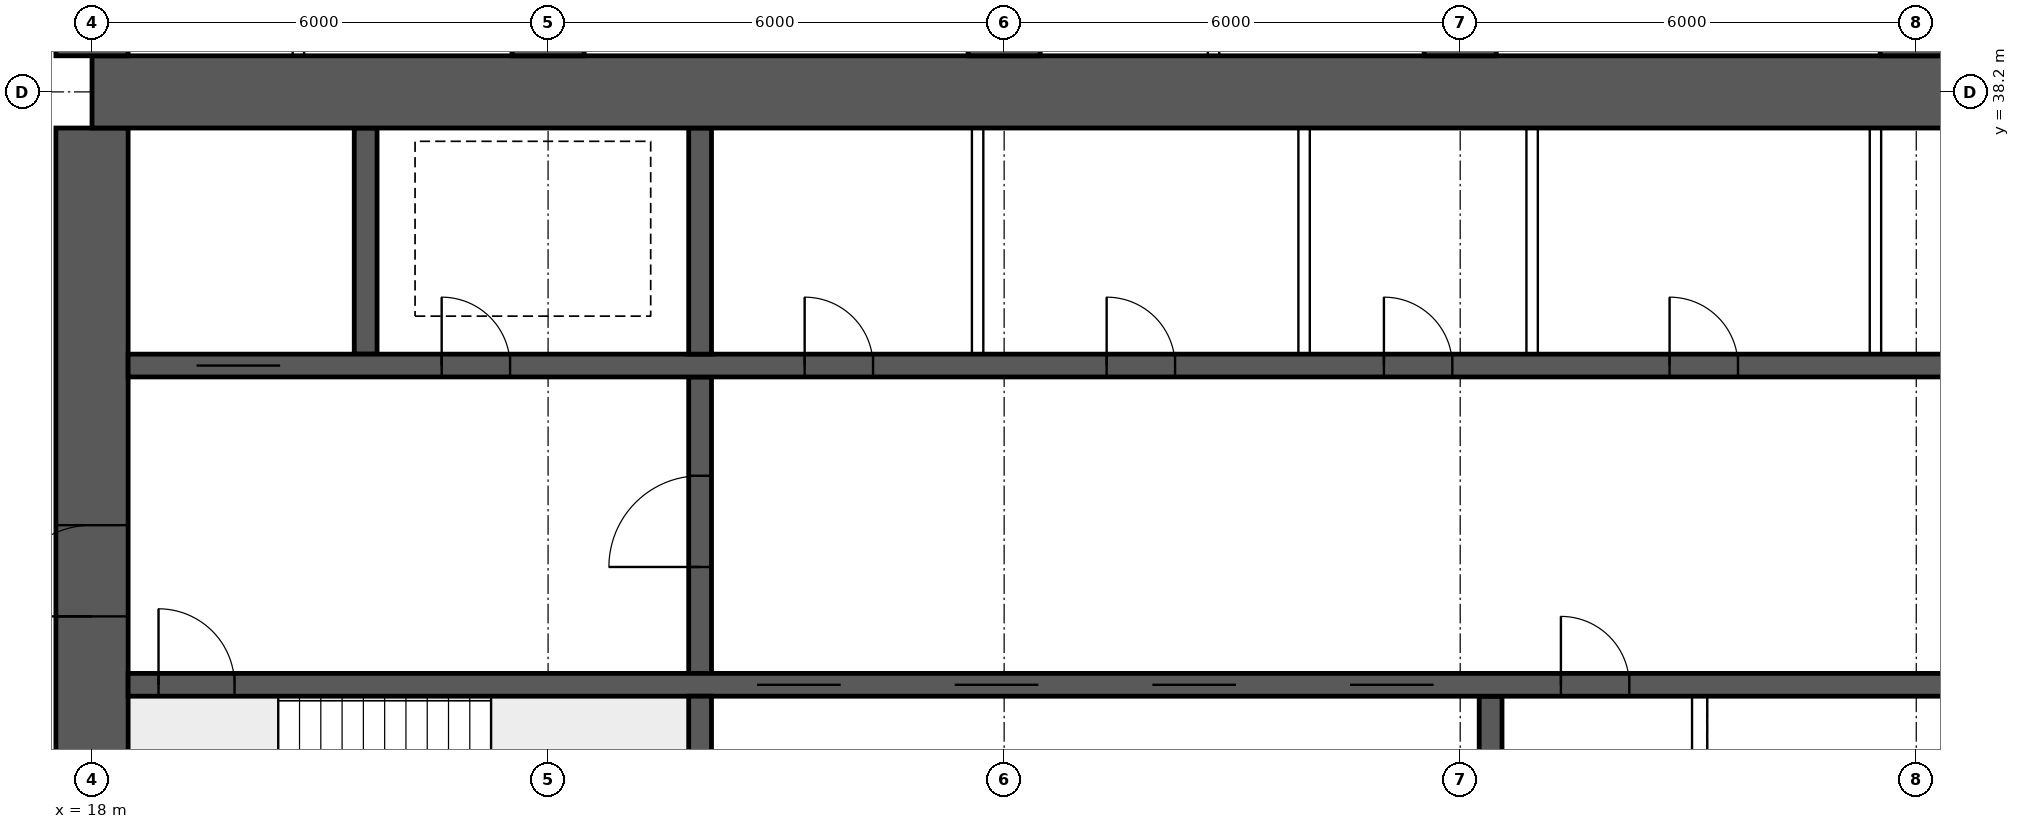
"""IFC4 building model, lengths in metres.
Left out: names, types, materials, properties, quantities, classifications, styles, units other than length and angle.
Written with IfcOpenShell. Run it as: python <this file> out.ifc"""

import sys

from ifc_helpers import new_model, si_unit, direction, frame, frame_2d, origin, place, context, subcontext, project, spatial, rectangle, extrude, element, fill, save


model = new_model("IFC4")
c1 = context("Model", 3, precision=1e-05, world=origin(), true_north=direction((0.0, 1.0)))
c2 = subcontext(c1, "Body", "Model", "MODEL_VIEW")
j1 = project(units=[si_unit("LENGTHUNIT", "METRE"), si_unit("PLANEANGLEUNIT", "RADIAN")], contexts=[c1])
p1 = place(None, origin())
s1 = spatial("IfcSite", under=j1, at=p1, CompositionType="ELEMENT")
p2 = place(p1, origin())
s2 = spatial("IfcBuilding", under=s1, at=p2, CompositionType="ELEMENT")
p3 = place(p2, frame((0.0, 0.0, 99.4)))
s3 = spatial("IfcBuildingStorey", under=s2, at=p3, CompositionType="ELEMENT", Elevation=99.4)
p4 = place(p3, frame((18.0, 38.2, 0.0), z_axis=(0.0, 0.0, 1.0), x_axis=(1.0, 0.0, 0.0)))
e1 = element("IfcWall", 1, at=p4, inside=s3, PredefinedType="SHEAR", context=c2, shape_type="SweptSolid", body=[
    extrude(rectangle(XDim=48.0, YDim=0.95, at=frame_2d((24.0, 0.0))), origin(), (0.0, 0.0, 1.0), 3.75),
])
p5 = place(p3, frame((18.0, 26.275, 0.0), z_axis=(0.0, 0.0, 1.0), x_axis=(0.0, 1.0, 0.0)))
e2 = element("IfcWall", 2, at=p5, inside=s3, PredefinedType="SHEAR", context=c2, shape_type="SweptSolid", body=[
    extrude(rectangle(XDim=11.45, YDim=0.95, at=frame_2d((5.725, 0.0))), origin(), (0.0, 0.0, 1.0), 3.75),
])
p6 = place(p5, frame((5.025, 0.0, 0.0)))
e3 = element("IfcOpeningElement", 3, at=p6, cuts=e2, PredefinedType="OPENING", context=c2, shape_type="SweptSolid", body=[
    extrude(rectangle(XDim=1.2, YDim=2.1, at=frame_2d((0.6, 1.05))), frame((0.0, 0.485, 0.0), z_axis=(0.0, -1.0, 0.0), x_axis=(1.0, 0.0, 0.0)), (0.0, 0.0, 1.0), 0.97),
])
p7 = place(p3, frame((18.475, 30.4, 0.0), z_axis=(0.0, 0.0, 1.0), x_axis=(1.0, 0.0, 0.0)))
e4 = element("IfcWall", 4, at=p7, inside=s3, PredefinedType="SHEAR", context=c2, shape_type="SweptSolid", body=[
    extrude(rectangle(XDim=47.05, YDim=0.3, at=frame_2d((23.525, 0.0))), origin(), (0.0, 0.0, 1.0), 3.75),
])
p8 = place(p7, frame((0.4, 0.0, 0.0)))
e5 = element("IfcOpeningElement", 5, at=p8, cuts=e4, PredefinedType="OPENING", context=c2, shape_type="SweptSolid", body=[
    extrude(rectangle(XDim=1.0, YDim=2.1, at=frame_2d((0.5, 1.05))), frame((0.0, 0.16, 0.0), z_axis=(0.0, -1.0, 0.0), x_axis=(1.0, 0.0, 0.0)), (0.0, 0.0, 1.0), 0.32),
])
p9 = place(p7, frame((45.65, 0.0, 0.0)))
e6 = element("IfcOpeningElement", 6, at=p9, cuts=e4, PredefinedType="OPENING", context=c2, shape_type="SweptSolid", body=[
    extrude(rectangle(XDim=1.0, YDim=2.1, at=frame_2d((0.5, 1.05))), frame((0.0, 0.16, 0.0), z_axis=(0.0, -1.0, 0.0), x_axis=(1.0, 0.0, 0.0)), (0.0, 0.0, 1.0), 0.32),
])
p10 = place(p7, frame((8.275, 0.0, 0.0)))
e7 = element("IfcOpeningElement", 7, at=p10, cuts=e4, PredefinedType="OPENING", context=c2, shape_type="SweptSolid", body=[
    extrude(rectangle(XDim=1.1, YDim=2.1, at=frame_2d((0.55, 1.05))), frame((0.0, 0.16, 0.0), z_axis=(0.0, -1.0, 0.0), x_axis=(1.0, 0.0, 0.0)), (0.0, 0.0, 1.0), 0.32),
])
p11 = place(p7, frame((10.875, 0.0, 0.0)))
e8 = element("IfcOpeningElement", 8, at=p11, cuts=e4, PredefinedType="OPENING", context=c2, shape_type="SweptSolid", body=[
    extrude(rectangle(XDim=1.1, YDim=2.1, at=frame_2d((0.55, 1.05))), frame((0.0, 0.16, 0.0), z_axis=(0.0, -1.0, 0.0), x_axis=(1.0, 0.0, 0.0)), (0.0, 0.0, 1.0), 0.32),
])
p12 = place(p7, frame((13.475, 0.0, 0.0)))
e9 = element("IfcOpeningElement", 9, at=p12, cuts=e4, PredefinedType="OPENING", context=c2, shape_type="SweptSolid", body=[
    extrude(rectangle(XDim=1.1, YDim=2.1, at=frame_2d((0.55, 1.05))), frame((0.0, 0.16, 0.0), z_axis=(0.0, -1.0, 0.0), x_axis=(1.0, 0.0, 0.0)), (0.0, 0.0, 1.0), 0.32),
])
p13 = place(p7, frame((16.075, 0.0, 0.0)))
e10 = element("IfcOpeningElement", 10, at=p13, cuts=e4, PredefinedType="OPENING", context=c2, shape_type="SweptSolid", body=[
    extrude(rectangle(XDim=1.1, YDim=2.1, at=frame_2d((0.55, 1.05))), frame((0.0, 0.16, 0.0), z_axis=(0.0, -1.0, 0.0), x_axis=(1.0, 0.0, 0.0)), (0.0, 0.0, 1.0), 0.32),
])
p14 = place(p7, frame((18.85, 0.0, 0.0)))
e11 = element("IfcOpeningElement", 11, at=p14, cuts=e4, PredefinedType="OPENING", context=c2, shape_type="SweptSolid", body=[
    extrude(rectangle(XDim=0.9, YDim=2.1, at=frame_2d((0.45, 1.05))), frame((0.0, 0.16, 0.0), z_axis=(0.0, -1.0, 0.0), x_axis=(1.0, 0.0, 0.0)), (0.0, 0.0, 1.0), 0.32),
])
p15 = place(p7, frame((30.142, 0.0, 0.0)))
e12 = element("IfcOpeningElement", 12, at=p15, cuts=e4, PredefinedType="OPENING", context=c2, shape_type="SweptSolid", body=[
    extrude(rectangle(XDim=1.1, YDim=2.1, at=frame_2d((0.55, 1.05))), frame((0.0, 0.16, 0.0), z_axis=(0.0, -1.0, 0.0), x_axis=(1.0, 0.0, 0.0)), (0.0, 0.0, 1.0), 0.32),
])
p16 = place(p7, frame((33.675, 0.0, 0.0)))
e13 = element("IfcOpeningElement", 13, at=p16, cuts=e4, PredefinedType="OPENING", context=c2, shape_type="SweptSolid", body=[
    extrude(rectangle(XDim=1.1, YDim=2.1, at=frame_2d((0.55, 1.05))), frame((0.0, 0.16, 0.0), z_axis=(0.0, -1.0, 0.0), x_axis=(1.0, 0.0, 0.0)), (0.0, 0.0, 1.0), 0.32),
])
p17 = place(p7, frame((37.208, 0.0, 0.0)))
e14 = element("IfcOpeningElement", 14, at=p17, cuts=e4, PredefinedType="OPENING", context=c2, shape_type="SweptSolid", body=[
    extrude(rectangle(XDim=1.1, YDim=2.1, at=frame_2d((0.55, 1.05))), frame((0.0, 0.16, 0.0), z_axis=(0.0, -1.0, 0.0), x_axis=(1.0, 0.0, 0.0)), (0.0, 0.0, 1.0), 0.32),
])
p18 = place(p3, frame((18.475, 34.6, 0.0), z_axis=(0.0, 0.0, 1.0), x_axis=(1.0, 0.0, 0.0)))
e15 = element("IfcWall", 15, at=p18, inside=s3, PredefinedType="SHEAR", context=c2, shape_type="SweptSolid", body=[
    extrude(rectangle(XDim=47.05, YDim=0.3, at=frame_2d((23.525, 0.0))), origin(), (0.0, 0.0, 1.0), 3.75),
])
p19 = place(p18, frame((0.9, 0.0, 0.0)))
e16 = element("IfcOpeningElement", 16, at=p19, cuts=e15, PredefinedType="OPENING", context=c2, shape_type="SweptSolid", body=[
    extrude(rectangle(XDim=1.1, YDim=2.1, at=frame_2d((0.55, 1.05))), frame((0.0, 0.16, 0.0), z_axis=(0.0, -1.0, 0.0), x_axis=(1.0, 0.0, 0.0)), (0.0, 0.0, 1.0), 0.32),
])
p20 = place(p18, frame((45.05, 0.0, 0.0)))
e17 = element("IfcOpeningElement", 17, at=p20, cuts=e15, PredefinedType="OPENING", context=c2, shape_type="SweptSolid", body=[
    extrude(rectangle(XDim=1.1, YDim=2.1, at=frame_2d((0.55, 1.05))), frame((0.0, 0.16, 0.0), z_axis=(0.0, -1.0, 0.0), x_axis=(1.0, 0.0, 0.0)), (0.0, 0.0, 1.0), 0.32),
])
p21 = place(p18, frame((4.125, 0.0, 0.0)))
e18 = element("IfcOpeningElement", 18, at=p21, cuts=e15, PredefinedType="OPENING", context=c2, shape_type="SweptSolid", body=[
    extrude(rectangle(XDim=0.9, YDim=2.1, at=frame_2d((0.45, 1.05))), frame((0.0, 0.16, 0.0), z_axis=(0.0, -1.0, 0.0), x_axis=(1.0, 0.0, 0.0)), (0.0, 0.0, 1.0), 0.32),
])
p22 = place(p18, frame((42.025, 0.0, 0.0)))
e19 = element("IfcOpeningElement", 19, at=p22, cuts=e15, PredefinedType="OPENING", context=c2, shape_type="SweptSolid", body=[
    extrude(rectangle(XDim=0.9, YDim=2.1, at=frame_2d((0.45, 1.05))), frame((0.0, 0.16, 0.0), z_axis=(0.0, -1.0, 0.0), x_axis=(1.0, 0.0, 0.0)), (0.0, 0.0, 1.0), 0.32),
])
p23 = place(p18, frame((8.9, 0.0, 0.0)))
e20 = element("IfcOpeningElement", 20, at=p23, cuts=e15, PredefinedType="OPENING", context=c2, shape_type="SweptSolid", body=[
    extrude(rectangle(XDim=0.9, YDim=2.1, at=frame_2d((0.45, 1.05))), frame((0.0, 0.16, 0.0), z_axis=(0.0, -1.0, 0.0), x_axis=(1.0, 0.0, 0.0)), (0.0, 0.0, 1.0), 0.32),
])
p24 = place(p18, frame((12.874, 0.0, 0.0)))
e21 = element("IfcOpeningElement", 21, at=p24, cuts=e15, PredefinedType="OPENING", context=c2, shape_type="SweptSolid", body=[
    extrude(rectangle(XDim=0.9, YDim=2.1, at=frame_2d((0.45, 1.05))), frame((0.0, 0.16, 0.0), z_axis=(0.0, -1.0, 0.0), x_axis=(1.0, 0.0, 0.0)), (0.0, 0.0, 1.0), 0.32),
])
p25 = place(p18, frame((16.521, 0.0, 0.0)))
e22 = element("IfcOpeningElement", 22, at=p25, cuts=e15, PredefinedType="OPENING", context=c2, shape_type="SweptSolid", body=[
    extrude(rectangle(XDim=0.9, YDim=2.1, at=frame_2d((0.45, 1.05))), frame((0.0, 0.16, 0.0), z_axis=(0.0, -1.0, 0.0), x_axis=(1.0, 0.0, 0.0)), (0.0, 0.0, 1.0), 0.32),
])
p26 = place(p18, frame((20.28, 0.0, 0.0)))
e23 = element("IfcOpeningElement", 23, at=p26, cuts=e15, PredefinedType="OPENING", context=c2, shape_type="SweptSolid", body=[
    extrude(rectangle(XDim=0.9, YDim=2.1, at=frame_2d((0.45, 1.05))), frame((0.0, 0.16, 0.0), z_axis=(0.0, -1.0, 0.0), x_axis=(1.0, 0.0, 0.0)), (0.0, 0.0, 1.0), 0.32),
])
p27 = place(p18, frame((24.686, 0.0, 0.0)))
e24 = element("IfcOpeningElement", 24, at=p27, cuts=e15, PredefinedType="OPENING", context=c2, shape_type="SweptSolid", body=[
    extrude(rectangle(XDim=0.9, YDim=2.1, at=frame_2d((0.45, 1.05))), frame((0.0, 0.16, 0.0), z_axis=(0.0, -1.0, 0.0), x_axis=(1.0, 0.0, 0.0)), (0.0, 0.0, 1.0), 0.32),
])
p28 = place(p18, frame((27.483, 0.0, 0.0)))
e25 = element("IfcOpeningElement", 25, at=p28, cuts=e15, PredefinedType="OPENING", context=c2, shape_type="SweptSolid", body=[
    extrude(rectangle(XDim=0.9, YDim=2.1, at=frame_2d((0.45, 1.05))), frame((0.0, 0.16, 0.0), z_axis=(0.0, -1.0, 0.0), x_axis=(1.0, 0.0, 0.0)), (0.0, 0.0, 1.0), 0.32),
])
p29 = place(p18, frame((29.653, 0.0, 0.0)))
e26 = element("IfcOpeningElement", 26, at=p29, cuts=e15, PredefinedType="OPENING", context=c2, shape_type="SweptSolid", body=[
    extrude(rectangle(XDim=0.9, YDim=2.1, at=frame_2d((0.45, 1.05))), frame((0.0, 0.16, 0.0), z_axis=(0.0, -1.0, 0.0), x_axis=(1.0, 0.0, 0.0)), (0.0, 0.0, 1.0), 0.32),
])
p30 = place(p18, frame((33.452, 0.0, 0.0)))
e27 = element("IfcOpeningElement", 27, at=p30, cuts=e15, PredefinedType="OPENING", context=c2, shape_type="SweptSolid", body=[
    extrude(rectangle(XDim=0.9, YDim=2.1, at=frame_2d((0.45, 1.05))), frame((0.0, 0.16, 0.0), z_axis=(0.0, -1.0, 0.0), x_axis=(1.0, 0.0, 0.0)), (0.0, 0.0, 1.0), 0.32),
])
p31 = place(p18, frame((37.403, 0.0, 0.0)))
e28 = element("IfcOpeningElement", 28, at=p31, cuts=e15, PredefinedType="OPENING", context=c2, shape_type="SweptSolid", body=[
    extrude(rectangle(XDim=0.9, YDim=2.1, at=frame_2d((0.45, 1.05))), frame((0.0, 0.16, 0.0), z_axis=(0.0, -1.0, 0.0), x_axis=(1.0, 0.0, 0.0)), (0.0, 0.0, 1.0), 0.32),
])
p32 = place(p3, frame((26.0, 26.275, 0.0), z_axis=(0.0, 0.0, 1.0), x_axis=(0.0, 1.0, 0.0)))
e29 = element("IfcWall", 29, at=p32, inside=s3, PredefinedType="SHEAR", context=c2, shape_type="SweptSolid", body=[
    extrude(rectangle(XDim=3.975, YDim=0.3, at=frame_2d((1.988, 0.0))), origin(), (0.0, 0.0, 1.0), 3.75),
])
p33 = place(p3, frame((26.0, 30.55, 0.0), z_axis=(0.0, 0.0, 1.0), x_axis=(0.0, 1.0, 0.0)))
e30 = element("IfcWall", 30, at=p33, inside=s3, PredefinedType="SHEAR", context=c2, shape_type="SweptSolid", body=[
    extrude(rectangle(XDim=3.9, YDim=0.3, at=frame_2d((1.95, 0.0))), origin(), (0.0, 0.0, 1.0), 3.75),
])
p34 = place(p33, frame((1.4, 0.0, 0.0)))
e31 = element("IfcOpeningElement", 31, at=p34, cuts=e30, PredefinedType="OPENING", context=c2, shape_type="SweptSolid", body=[
    extrude(rectangle(XDim=1.2, YDim=2.1, at=frame_2d((0.6, 1.05))), frame((0.0, 0.16, 0.0), z_axis=(0.0, -1.0, 0.0), x_axis=(1.0, 0.0, 0.0)), (0.0, 0.0, 1.0), 0.32),
])
for number, where, z_axis, x_axis in (
    (32, (21.6, 34.75, 0.0), (0.0, 0.0, 1.0), (0.0, 1.0, 0.0)),
    (33, (26.0, 34.75, 0.0), (0.0, 0.0, 1.0), (0.0, 1.0, 0.0)),
):
    element("IfcWall", number, at=place(p3, frame(where, z_axis=z_axis, x_axis=x_axis)), inside=s3, PredefinedType="SHEAR", context=c2, shape_type="SweptSolid", body=[
        extrude(rectangle(XDim=2.975, YDim=0.3, at=frame_2d((1.488, 0.0))), origin(), (0.0, 0.0, 1.0), 3.75),
    ])
p35 = place(p3, frame((36.4, 26.275, 0.0), z_axis=(0.0, 0.0, 1.0), x_axis=(0.0, 1.0, 0.0)))
e34 = element("IfcWall", 34, at=p35, inside=s3, PredefinedType="SHEAR", context=c2, shape_type="SweptSolid", body=[
    extrude(rectangle(XDim=3.975, YDim=0.3, at=frame_2d((1.988, 0.0))), origin(), (0.0, 0.0, 1.0), 3.75),
])
for number, where, z_axis, x_axis in (
    (35, (18.0, 38.675, 0.0), (0.0, 0.0, 1.0), (0.0, 1.0, 0.0)),
    (36, (24.0, 38.675, 0.0), (0.0, 0.0, 1.0), (0.0, 1.0, 0.0)),
    (37, (30.0, 38.675, 0.0), (0.0, 0.0, 1.0), (0.0, 1.0, 0.0)),
    (38, (36.0, 38.675, 0.0), (0.0, 0.0, 1.0), (0.0, 1.0, 0.0)),
    (39, (42.0, 38.675, 0.0), (0.0, 0.0, 1.0), (0.0, 1.0, 0.0)),
):
    element("IfcWall", number, at=place(p3, frame(where, z_axis=z_axis, x_axis=x_axis)), inside=s3, PredefinedType="SHEAR", context=c2, shape_type="SweptSolid", body=[
        extrude(rectangle(XDim=9.325, YDim=0.95, at=frame_2d((4.663, 0.0))), origin(), (0.0, 0.0, 1.0), 3.75),
    ])
for number, where, z_axis, x_axis in (
    (40, (29.651, 34.75, 0.0), (0.0, 0.0, 1.0), (0.0, 1.0, 0.0)),
    (41, (33.946, 34.75, 0.0), (0.0, 0.0, 1.0), (0.0, 1.0, 0.0)),
    (42, (36.946, 34.75, 0.0), (0.0, 0.0, 1.0), (0.0, 1.0, 0.0)),
    (43, (41.463, 34.75, 0.0), (0.0, 0.0, 1.0), (0.0, 1.0, 0.0)),
):
    element("IfcWall", number, at=place(p3, frame(where, z_axis=z_axis, x_axis=x_axis)), inside=s3, PredefinedType="SOLIDWALL", context=c2, shape_type="SweptSolid", body=[
        extrude(rectangle(XDim=2.975, YDim=0.15, at=frame_2d((1.488, 0.0))), origin(), (0.0, 0.0, 1.0), 3.5),
    ])
p36 = place(p3, frame((39.15, 26.275, 0.0), z_axis=(0.0, 0.0, 1.0), x_axis=(0.0, 1.0, 0.0)))
e44 = element("IfcWall", 44, at=p36, inside=s3, PredefinedType="SOLIDWALL", context=c2, shape_type="SweptSolid", body=[
    extrude(rectangle(XDim=3.975, YDim=0.2, at=frame_2d((1.988, 0.0))), origin(), (0.0, 0.0, 1.0), 3.5),
])
for number, where, z_axis, x_axis in (
    (45, (20.715, 38.675, 0.0), (0.0, 0.0, 1.0), (0.0, 1.0, 0.0)),
    (46, (32.755, 38.675, 0.0), (0.0, 0.0, 1.0), (0.0, 1.0, 0.0)),
):
    element("IfcWall", number, at=place(p3, frame(where, z_axis=z_axis, x_axis=x_axis)), inside=s3, PredefinedType="PARTITIONING", context=c2, shape_type="SweptSolid", body=[
        extrude(rectangle(XDim=9.225, YDim=0.15, at=frame_2d((4.612, 0.0))), origin(), (0.0, 0.0, 1.0), 3.5),
    ])
p37 = place(p6, origin())
e47 = element("IfcDoor", 47, at=p37, inside=s3, OperationType="SINGLE_SWING_LEFT", PredefinedType="DOOR", context=c2, shape_type="SweptSolid", body=[
    extrude(rectangle(XDim=1.2, YDim=2.1, at=frame_2d((0.6, 1.05))), frame((0.0, 0.025, 0.0), z_axis=(0.0, -1.0, 0.0), x_axis=(1.0, 0.0, 0.0)), (0.0, 0.0, 1.0), 0.05),
])
fill(e3, e47)
p38 = place(p8, origin())
e48 = element("IfcDoor", 48, at=p38, inside=s3, OperationType="SINGLE_SWING_LEFT", PredefinedType="DOOR", context=c2, shape_type="SweptSolid", body=[
    extrude(rectangle(XDim=1.0, YDim=2.1, at=frame_2d((0.5, 1.05))), frame((0.0, 0.025, 0.0), z_axis=(0.0, -1.0, 0.0), x_axis=(1.0, 0.0, 0.0)), (0.0, 0.0, 1.0), 0.05),
])
fill(e5, e48)
p39 = place(p19, origin())
e49 = element("IfcDoor", 49, at=p39, inside=s3, OperationType="DOUBLE_DOOR_SLIDING", PredefinedType="DOOR", context=c2, shape_type="SweptSolid", body=[
    extrude(rectangle(XDim=1.1, YDim=2.1, at=frame_2d((0.55, 1.05))), frame((0.0, 0.025, 0.0), z_axis=(0.0, -1.0, 0.0), x_axis=(1.0, 0.0, 0.0)), (0.0, 0.0, 1.0), 0.05),
])
fill(e16, e49)
p40 = place(p21, origin())
e50 = element("IfcDoor", 50, at=p40, inside=s3, OperationType="SINGLE_SWING_LEFT", PredefinedType="DOOR", context=c2, shape_type="SweptSolid", body=[
    extrude(rectangle(XDim=0.9, YDim=2.1, at=frame_2d((0.45, 1.05))), frame((0.0, 0.025, 0.0), z_axis=(0.0, -1.0, 0.0), x_axis=(1.0, 0.0, 0.0)), (0.0, 0.0, 1.0), 0.05),
])
fill(e18, e50)
p41 = place(p34, origin())
e51 = element("IfcDoor", 51, at=p41, inside=s3, OperationType="SINGLE_SWING_LEFT", PredefinedType="DOOR", context=c2, shape_type="SweptSolid", body=[
    extrude(rectangle(XDim=1.2, YDim=2.1, at=frame_2d((0.6, 1.05))), frame((0.0, 0.025, 0.0), z_axis=(0.0, -1.0, 0.0), x_axis=(1.0, 0.0, 0.0)), (0.0, 0.0, 1.0), 0.05),
])
fill(e31, e51)
p42 = place(p23, origin())
e52 = element("IfcDoor", 52, at=p42, inside=s3, OperationType="SINGLE_SWING_LEFT", PredefinedType="DOOR", context=c2, shape_type="SweptSolid", body=[
    extrude(rectangle(XDim=0.9, YDim=2.1, at=frame_2d((0.45, 1.05))), frame((0.0, 0.025, 0.0), z_axis=(0.0, -1.0, 0.0), x_axis=(1.0, 0.0, 0.0)), (0.0, 0.0, 1.0), 0.05),
])
fill(e20, e52)
p43 = place(p24, origin())
e53 = element("IfcDoor", 53, at=p43, inside=s3, OperationType="SINGLE_SWING_LEFT", PredefinedType="DOOR", context=c2, shape_type="SweptSolid", body=[
    extrude(rectangle(XDim=0.9, YDim=2.1, at=frame_2d((0.45, 1.05))), frame((0.0, 0.025, 0.0), z_axis=(0.0, -1.0, 0.0), x_axis=(1.0, 0.0, 0.0)), (0.0, 0.0, 1.0), 0.05),
])
fill(e21, e53)
p44 = place(p25, origin())
e54 = element("IfcDoor", 54, at=p44, inside=s3, OperationType="SINGLE_SWING_LEFT", PredefinedType="DOOR", context=c2, shape_type="SweptSolid", body=[
    extrude(rectangle(XDim=0.9, YDim=2.1, at=frame_2d((0.45, 1.05))), frame((0.0, 0.025, 0.0), z_axis=(0.0, -1.0, 0.0), x_axis=(1.0, 0.0, 0.0)), (0.0, 0.0, 1.0), 0.05),
])
fill(e22, e54)
p45 = place(p26, origin())
e55 = element("IfcDoor", 55, at=p45, inside=s3, OperationType="SINGLE_SWING_LEFT", PredefinedType="DOOR", context=c2, shape_type="SweptSolid", body=[
    extrude(rectangle(XDim=0.9, YDim=2.1, at=frame_2d((0.45, 1.05))), frame((0.0, 0.025, 0.0), z_axis=(0.0, -1.0, 0.0), x_axis=(1.0, 0.0, 0.0)), (0.0, 0.0, 1.0), 0.05),
])
fill(e23, e55)
p46 = place(p10, origin())
e56 = element("IfcDoor", 56, at=p46, inside=s3, OperationType="DOUBLE_DOOR_SLIDING", PredefinedType="DOOR", context=c2, shape_type="SweptSolid", body=[
    extrude(rectangle(XDim=1.1, YDim=2.1, at=frame_2d((0.55, 1.05))), frame((0.0, 0.025, 0.0), z_axis=(0.0, -1.0, 0.0), x_axis=(1.0, 0.0, 0.0)), (0.0, 0.0, 1.0), 0.05),
])
fill(e7, e56)
p47 = place(p11, origin())
e57 = element("IfcDoor", 57, at=p47, inside=s3, OperationType="DOUBLE_DOOR_SLIDING", PredefinedType="DOOR", context=c2, shape_type="SweptSolid", body=[
    extrude(rectangle(XDim=1.1, YDim=2.1, at=frame_2d((0.55, 1.05))), frame((0.0, 0.025, 0.0), z_axis=(0.0, -1.0, 0.0), x_axis=(1.0, 0.0, 0.0)), (0.0, 0.0, 1.0), 0.05),
])
fill(e8, e57)
p48 = place(p12, origin())
e58 = element("IfcDoor", 58, at=p48, inside=s3, OperationType="DOUBLE_DOOR_SLIDING", PredefinedType="DOOR", context=c2, shape_type="SweptSolid", body=[
    extrude(rectangle(XDim=1.1, YDim=2.1, at=frame_2d((0.55, 1.05))), frame((0.0, 0.025, 0.0), z_axis=(0.0, -1.0, 0.0), x_axis=(1.0, 0.0, 0.0)), (0.0, 0.0, 1.0), 0.05),
])
fill(e9, e58)
p49 = place(p13, origin())
e59 = element("IfcDoor", 59, at=p49, inside=s3, OperationType="DOUBLE_DOOR_SLIDING", PredefinedType="DOOR", context=c2, shape_type="SweptSolid", body=[
    extrude(rectangle(XDim=1.1, YDim=2.1, at=frame_2d((0.55, 1.05))), frame((0.0, 0.025, 0.0), z_axis=(0.0, -1.0, 0.0), x_axis=(1.0, 0.0, 0.0)), (0.0, 0.0, 1.0), 0.05),
])
fill(e10, e59)
p50 = place(p14, origin())
e60 = element("IfcDoor", 60, at=p50, inside=s3, OperationType="SINGLE_SWING_LEFT", PredefinedType="DOOR", context=c2, shape_type="SweptSolid", body=[
    extrude(rectangle(XDim=0.9, YDim=2.1, at=frame_2d((0.45, 1.05))), frame((0.0, 0.025, 0.0), z_axis=(0.0, -1.0, 0.0), x_axis=(1.0, 0.0, 0.0)), (0.0, 0.0, 1.0), 0.05),
])
fill(e11, e60)
save(model, sys.argv[1])
